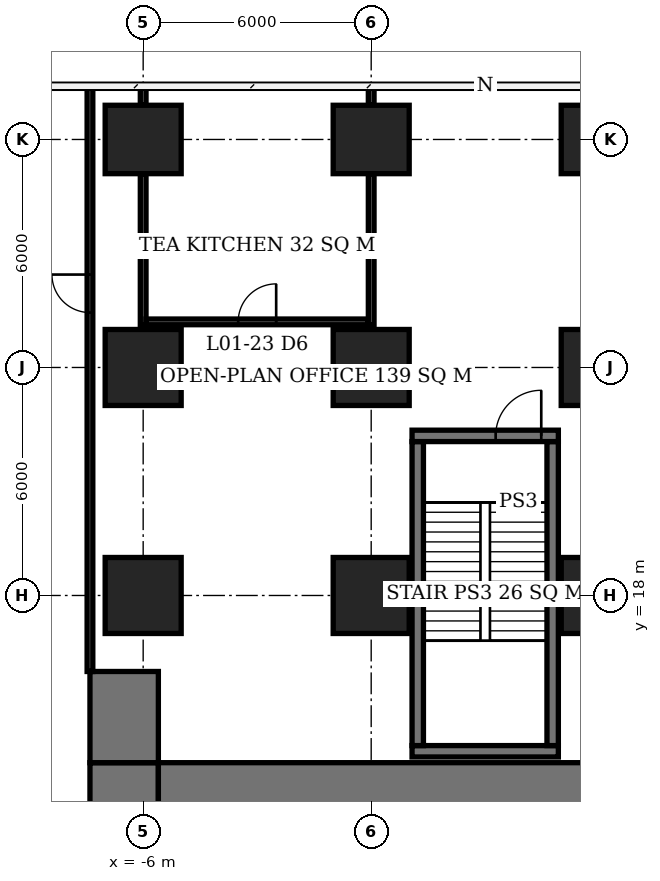
"""IFC4 building model, lengths in metres.
Left out: names, types, materials, properties, quantities, classifications, styles, units other than length and angle.
Written with IfcOpenShell. Run it as: python <this file> out.ifc"""

import sys

from ifc_helpers import new_model, si_unit, direction, frame, frame_2d, origin, origin_2d, place, context, subcontext, project, spatial, rectangle, extrude, element, fill, save


model = new_model("IFC4")
c1 = context("Model", 3, precision=1e-05, world=origin(), true_north=direction((0.0, 1.0)))
c2 = subcontext(c1, "Body", "Model", "MODEL_VIEW")
j1 = project(units=[si_unit("LENGTHUNIT", "METRE"), si_unit("PLANEANGLEUNIT", "RADIAN")], contexts=[c1])
p1 = place(None, origin())
s1 = spatial("IfcSite", under=j1, at=p1, CompositionType="ELEMENT")
p2 = place(p1, origin())
s2 = spatial("IfcBuilding", under=s1, at=p2, CompositionType="ELEMENT")
p3 = place(p2, frame((0.0, 0.0, 6.0)))
s3 = spatial("IfcBuildingStorey", under=s2, at=p3, CompositionType="ELEMENT", Elevation=6.0)
for number, where, z_axis, x_axis in (
    (1, (-6.0, 18.0, 0.0), (0.0, 0.0, 1.0), (1.0, 0.0, 0.0)),
    (2, (-6.0, 24.0, 0.0), (0.0, 0.0, 1.0), (1.0, 0.0, 0.0)),
):
    element("IfcColumn", number, at=place(p3, frame(where, z_axis=z_axis, x_axis=x_axis)), inside=s3, PredefinedType="COLUMN", context=c2, shape_type="SweptSolid", body=[
        extrude(rectangle(XDim=2.0, YDim=2.0, at=origin_2d()), origin(), (0.0, 0.0, 1.0), 5.0),
    ])
p4 = place(p3, frame((-6.0, 30.0, 0.0), z_axis=(0.0, 0.0, 1.0), x_axis=(1.0, 0.0, 0.0)))
e3 = element("IfcColumn", 3, at=p4, inside=s3, PredefinedType="COLUMN", context=c2, shape_type="SweptSolid", body=[
    extrude(rectangle(XDim=2.0, YDim=1.8, at=origin_2d()), origin(), (0.0, 0.0, 1.0), 5.0),
])
for number, where, z_axis, x_axis in (
    (4, (0.0, 18.0, 0.0), (0.0, 0.0, 1.0), (1.0, 0.0, 0.0)),
    (5, (0.0, 24.0, 0.0), (0.0, 0.0, 1.0), (1.0, 0.0, 0.0)),
):
    element("IfcColumn", number, at=place(p3, frame(where, z_axis=z_axis, x_axis=x_axis)), inside=s3, PredefinedType="COLUMN", context=c2, shape_type="SweptSolid", body=[
        extrude(rectangle(XDim=2.0, YDim=2.0, at=origin_2d()), origin(), (0.0, 0.0, 1.0), 5.0),
    ])
p5 = place(p3, frame((0.0, 30.0, 0.0), z_axis=(0.0, 0.0, 1.0), x_axis=(1.0, 0.0, 0.0)))
e6 = element("IfcColumn", 6, at=p5, inside=s3, PredefinedType="COLUMN", context=c2, shape_type="SweptSolid", body=[
    extrude(rectangle(XDim=2.0, YDim=1.8, at=origin_2d()), origin(), (0.0, 0.0, 1.0), 5.0),
])
for number, where, z_axis, x_axis in (
    (7, (6.0, 18.0, 0.0), (0.0, 0.0, 1.0), (1.0, 0.0, 0.0)),
    (8, (6.0, 24.0, 0.0), (0.0, 0.0, 1.0), (1.0, 0.0, 0.0)),
):
    element("IfcColumn", number, at=place(p3, frame(where, z_axis=z_axis, x_axis=x_axis)), inside=s3, PredefinedType="COLUMN", context=c2, shape_type="SweptSolid", body=[
        extrude(rectangle(XDim=2.0, YDim=2.0, at=origin_2d()), origin(), (0.0, 0.0, 1.0), 5.0),
    ])
p6 = place(p3, frame((6.0, 30.0, 0.0), z_axis=(0.0, 0.0, 1.0), x_axis=(1.0, 0.0, 0.0)))
e9 = element("IfcColumn", 9, at=p6, inside=s3, PredefinedType="COLUMN", context=c2, shape_type="SweptSolid", body=[
    extrude(rectangle(XDim=2.0, YDim=1.8, at=origin_2d()), origin(), (0.0, 0.0, 1.0), 5.0),
])
p7 = place(p3, frame((-5.6, 12.6, 0.0), z_axis=(0.0, 0.0, 1.0), x_axis=(1.0, 0.0, 0.0)))
e10 = element("IfcWall", 10, at=p7, inside=s3, PredefinedType="SHEAR", context=c2, shape_type="SweptSolid", body=[
    extrude(rectangle(XDim=23.2, YDim=2.0, at=frame_2d((11.6, 0.0))), origin(), (0.0, 0.0, 1.0), 5.0),
])
p8 = place(p3, frame((-6.5, -7.6, 0.0), z_axis=(0.0, 0.0, 1.0), x_axis=(0.0, 1.0, 0.0)))
e11 = element("IfcWall", 11, at=p8, inside=s3, PredefinedType="SHEAR", context=c2, shape_type="SweptSolid", body=[
    extrude(rectangle(XDim=21.2, YDim=1.8, at=frame_2d((10.6, 0.0))), origin(), (0.0, 0.0, 1.0), 5.0),
])
p9 = place(p8, frame((7.8, 0.0, 0.0)))
e12 = element("IfcOpeningElement", 12, at=p9, cuts=e11, PredefinedType="OPENING", context=c2, shape_type="SweptSolid", body=[
    extrude(rectangle(XDim=1.8, YDim=2.4, at=frame_2d((0.9, 1.2))), frame((0.0, 0.91, 0.0), z_axis=(0.0, -1.0, 0.0), x_axis=(1.0, 0.0, 0.0)), (0.0, 0.0, 1.0), 1.82),
])
p10 = place(p3, frame((-6.5, 13.6, 0.0), z_axis=(0.0, 0.0, 1.0), x_axis=(0.0, 1.0, 0.0)))
e13 = element("IfcWall", 13, at=p10, inside=s3, PredefinedType="SHEAR", context=c2, shape_type="SweptSolid", body=[
    extrude(rectangle(XDim=2.4, YDim=1.8, at=frame_2d((1.2, 0.0))), origin(), (0.0, 0.0, 1.0), 5.0),
])
p11 = place(p3, frame((1.075, 13.9, 0.0), z_axis=(0.0, 0.0, 1.0), x_axis=(1.0, 0.0, 0.0)))
e14 = element("IfcWall", 14, at=p11, inside=s3, PredefinedType="SOLIDWALL", context=c2, shape_type="SweptSolid", body=[
    extrude(rectangle(XDim=3.85, YDim=0.3, at=frame_2d((1.925, 0.0))), origin(), (0.0, 0.0, 1.0), 4.75),
])
p12 = place(p3, frame((1.075, 22.2, 0.0), z_axis=(0.0, 0.0, 1.0), x_axis=(1.0, 0.0, 0.0)))
e15 = element("IfcWall", 15, at=p12, inside=s3, PredefinedType="SOLIDWALL", context=c2, shape_type="SweptSolid", body=[
    extrude(rectangle(XDim=3.85, YDim=0.3, at=frame_2d((1.925, 0.0))), origin(), (0.0, 0.0, 1.0), 4.75),
])
p13 = place(p12, frame((2.2, 0.0, 0.0)))
e16 = element("IfcOpeningElement", 16, at=p13, cuts=e15, PredefinedType="OPENING", context=c2, shape_type="SweptSolid", body=[
    extrude(rectangle(XDim=1.2, YDim=2.1, at=frame_2d((0.6, 1.05))), frame((0.0, 0.16, 0.0), z_axis=(0.0, -1.0, 0.0), x_axis=(1.0, 0.0, 0.0)), (0.0, 0.0, 1.0), 0.32),
])
for number, where, z_axis, x_axis in (
    (17, (1.225, 14.05, 0.0), (0.0, 0.0, 1.0), (0.0, 1.0, 0.0)),
    (18, (4.775, 14.05, 0.0), (0.0, 0.0, 1.0), (0.0, 1.0, 0.0)),
):
    element("IfcWall", number, at=place(p3, frame(where, z_axis=z_axis, x_axis=x_axis)), inside=s3, PredefinedType="SOLIDWALL", context=c2, shape_type="SweptSolid", body=[
        extrude(rectangle(XDim=8.0, YDim=0.3, at=frame_2d((4.0, 0.0))), origin(), (0.0, 0.0, 1.0), 4.75),
    ])
p14 = place(p3, frame((-5.925, 25.2, 0.0), z_axis=(0.0, 0.0, 1.0), x_axis=(1.0, 0.0, 0.0)))
e19 = element("IfcWall", 19, at=p14, inside=s3, PredefinedType="PARTITIONING", context=c2, shape_type="SweptSolid", body=[
    extrude(rectangle(XDim=5.85, YDim=0.15, at=frame_2d((2.925, 0.0))), origin(), (0.0, 0.0, 1.0), 4.75),
])
p15 = place(p14, frame((2.425, 0.0, 0.0)))
e20 = element("IfcOpeningElement", 20, at=p15, cuts=e19, PredefinedType="OPENING", context=c2, shape_type="SweptSolid", body=[
    extrude(rectangle(XDim=1.0, YDim=2.1, at=frame_2d((0.5, 1.05))), frame((0.0, 0.085, 0.0), z_axis=(0.0, -1.0, 0.0), x_axis=(1.0, 0.0, 0.0)), (0.0, 0.0, 1.0), 0.17),
])
p16 = place(p3, frame((-6.0, 25.125, 0.0), z_axis=(0.0, 0.0, 1.0), x_axis=(0.0, 1.0, 0.0)))
e21 = element("IfcWall", 21, at=p16, inside=s3, PredefinedType="PARTITIONING", context=c2, shape_type="SweptSolid", body=[
    extrude(rectangle(XDim=3.975, YDim=0.15, at=frame_2d((1.988, 0.0))), origin(), (0.0, 0.0, 1.0), 4.75),
])
p17 = place(p3, frame((-6.0, 30.9, 0.0), z_axis=(0.0, 0.0, 1.0), x_axis=(0.0, 1.0, 0.0)))
e22 = element("IfcWall", 22, at=p17, inside=s3, PredefinedType="PARTITIONING", context=c2, shape_type="SweptSolid", body=[
    extrude(rectangle(XDim=0.475, YDim=0.15, at=frame_2d((0.238, 0.0))), origin(), (0.0, 0.0, 1.0), 4.75),
])
p18 = place(p3, frame((0.0, 25.125, 0.0), z_axis=(0.0, 0.0, 1.0), x_axis=(0.0, 1.0, 0.0)))
e23 = element("IfcWall", 23, at=p18, inside=s3, PredefinedType="PARTITIONING", context=c2, shape_type="SweptSolid", body=[
    extrude(rectangle(XDim=3.975, YDim=0.15, at=frame_2d((1.988, 0.0))), origin(), (0.0, 0.0, 1.0), 4.75),
])
p19 = place(p3, frame((0.0, 30.9, 0.0), z_axis=(0.0, 0.0, 1.0), x_axis=(0.0, 1.0, 0.0)))
e24 = element("IfcWall", 24, at=p19, inside=s3, PredefinedType="PARTITIONING", context=c2, shape_type="SweptSolid", body=[
    extrude(rectangle(XDim=0.45, YDim=0.15, at=frame_2d((0.225, 0.0))), origin(), (0.0, 0.0, 1.0), 4.75),
])
p20 = place(p3, frame((-7.4, 16.0, 0.0), z_axis=(0.0, 0.0, 1.0), x_axis=(0.0, 1.0, 0.0)))
e25 = element("IfcWall", 25, at=p20, inside=s3, PredefinedType="PARTITIONING", context=c2, shape_type="SweptSolid", body=[
    extrude(rectangle(XDim=15.375, YDim=0.15, at=frame_2d((7.688, 0.0))), origin(), (0.0, 0.0, 1.0), 4.75),
])
p21 = place(p20, frame((9.445, 0.0, 0.0)))
e26 = element("IfcOpeningElement", 26, at=p21, cuts=e25, PredefinedType="OPENING", context=c2, shape_type="SweptSolid", body=[
    extrude(rectangle(XDim=1.0, YDim=2.1, at=frame_2d((0.5, 1.05))), frame((0.0, 0.085, 0.0), z_axis=(0.0, -1.0, 0.0), x_axis=(1.0, 0.0, 0.0)), (0.0, 0.0, 1.0), 0.17),
])
p22 = place(p13, origin())
e27 = element("IfcDoor", 27, at=p22, inside=s3, OperationType="SINGLE_SWING_RIGHT", PredefinedType="DOOR", context=c2, shape_type="SweptSolid", body=[
    extrude(rectangle(XDim=1.2, YDim=2.1, at=frame_2d((0.6, 1.05))), frame((0.0, 0.025, 0.0), z_axis=(0.0, -1.0, 0.0), x_axis=(1.0, 0.0, 0.0)), (0.0, 0.0, 1.0), 0.05),
])
fill(e16, e27)
p23 = place(p15, origin())
e28 = element("IfcDoor", 28, at=p23, inside=s3, OperationType="SINGLE_SWING_RIGHT", PredefinedType="DOOR", context=c2, shape_type="SweptSolid", body=[
    extrude(rectangle(XDim=1.0, YDim=2.1, at=frame_2d((0.5, 1.05))), frame((0.0, 0.025, 0.0), z_axis=(0.0, -1.0, 0.0), x_axis=(1.0, 0.0, 0.0)), (0.0, 0.0, 1.0), 0.05),
])
fill(e20, e28)
p24 = place(p21, origin())
e29 = element("IfcDoor", 29, at=p24, inside=s3, OperationType="SINGLE_SWING_RIGHT", PredefinedType="DOOR", context=c2, shape_type="SweptSolid", body=[
    extrude(rectangle(XDim=1.0, YDim=2.1, at=frame_2d((0.5, 1.05))), frame((0.0, 0.025, 0.0), z_axis=(0.0, -1.0, 0.0), x_axis=(1.0, 0.0, 0.0)), (0.0, 0.0, 1.0), 0.05),
])
fill(e26, e29)
save(model, sys.argv[1])
